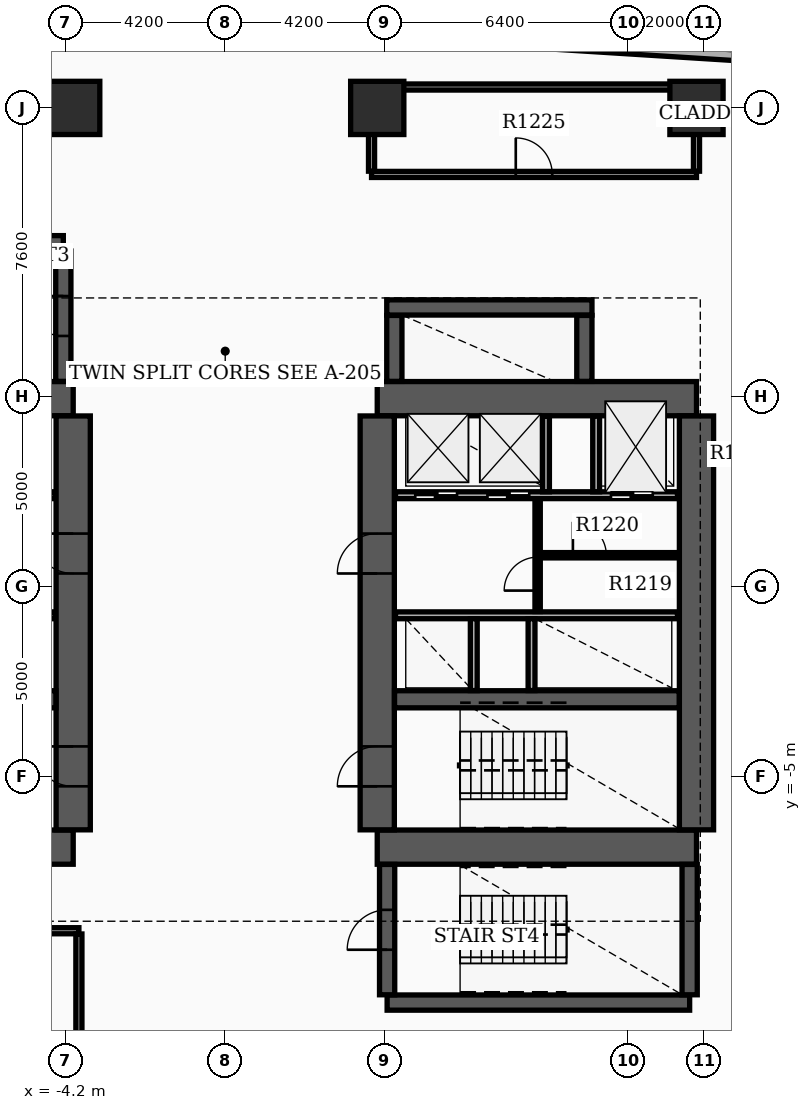
"""IFC4 building model, lengths in metres.
Left out: names, types, materials, properties, quantities, classifications, styles, units other than length and angle.
Written with IfcOpenShell. Run it as: python <this file> out.ifc"""

import sys

from ifc_helpers import new_model, si_unit, direction, frame, frame_2d, origin, origin_2d, place, context, subcontext, project, spatial, rectangle, extrude, element, fill, save


model = new_model("IFC4")
c1 = context("Model", 3, precision=1e-05, world=origin(), true_north=direction((0.0, 1.0)))
c2 = subcontext(c1, "Body", "Model", "MODEL_VIEW")
j1 = project(units=[si_unit("LENGTHUNIT", "METRE"), si_unit("PLANEANGLEUNIT", "RADIAN")], contexts=[c1])
p1 = place(None, origin())
s1 = spatial("IfcSite", under=j1, at=p1, CompositionType="ELEMENT")
p2 = place(p1, origin())
s2 = spatial("IfcBuilding", under=s1, at=p2, CompositionType="ELEMENT")
p3 = place(p2, frame((0.0, 0.0, 79.5)))
s3 = spatial("IfcBuildingStorey", under=s2, at=p3, CompositionType="ELEMENT", Elevation=79.5)
for number, where, z_axis, x_axis in (
    (1, (-12.4, -6.85, 0.0), (0.0, 0.0, 1.0), (1.0, 0.0, 0.0)),
    (2, (-12.4, 4.95, 0.0), (0.0, 0.0, 1.0), (1.0, 0.0, 0.0)),
):
    element("IfcWall", number, at=place(p3, frame(where, z_axis=z_axis, x_axis=x_axis)), inside=s3, PredefinedType="SHEAR", context=c2, shape_type="SweptSolid", body=[
        extrude(rectangle(XDim=8.4, YDim=0.9, at=frame_2d((4.2, 0.0))), origin(), (0.0, 0.0, 1.0), 3.7),
    ])
p4 = place(p3, frame((-4.0, -6.395, 0.0), z_axis=(0.0, 0.0, 1.0), x_axis=(0.0, 1.0, 0.0)))
e3 = element("IfcWall", 3, at=p4, inside=s3, PredefinedType="SHEAR", context=c2, shape_type="SweptSolid", body=[
    extrude(rectangle(XDim=10.89, YDim=0.9, at=frame_2d((5.445, 0.0))), origin(), (0.0, 0.0, 1.0), 3.7),
])
p5 = place(p4, frame((1.145, 0.0, 0.0)))
e4 = element("IfcOpeningElement", 4, at=p5, cuts=e3, PredefinedType="OPENING", context=c2, shape_type="SweptSolid", body=[
    extrude(rectangle(XDim=1.05, YDim=2.15, at=frame_2d((0.525, 1.075))), frame((0.0, 0.46, 0.0), z_axis=(0.0, -1.0, 0.0), x_axis=(1.0, 0.0, 0.0)), (0.0, 0.0, 1.0), 0.92),
])
p6 = place(p4, frame((6.745, 0.0, 0.0)))
e5 = element("IfcOpeningElement", 5, at=p6, cuts=e3, PredefinedType="OPENING", context=c2, shape_type="SweptSolid", body=[
    extrude(rectangle(XDim=1.05, YDim=2.15, at=frame_2d((0.525, 1.075))), frame((0.0, 0.46, 0.0), z_axis=(0.0, -1.0, 0.0), x_axis=(1.0, 0.0, 0.0)), (0.0, 0.0, 1.0), 0.92),
])
p7 = place(p3, frame((-11.945, -2.96, 0.0), z_axis=(0.0, 0.0, 1.0), x_axis=(1.0, 0.0, 0.0)))
e6 = element("IfcWall", 6, at=p7, inside=s3, PredefinedType="SHEAR", context=c2, shape_type="SweptSolid", body=[
    extrude(rectangle(XDim=7.49, YDim=0.45, at=frame_2d((3.745, 0.0))), origin(), (0.0, 0.0, 1.0), 3.7),
])
for number, where, z_axis, x_axis in (
    (7, (4.0, -6.85, 0.0), (0.0, 0.0, 1.0), (1.0, 0.0, 0.0)),
    (8, (4.0, 4.95, 0.0), (0.0, 0.0, 1.0), (1.0, 0.0, 0.0)),
):
    element("IfcWall", number, at=place(p3, frame(where, z_axis=z_axis, x_axis=x_axis)), inside=s3, PredefinedType="SHEAR", context=c2, shape_type="SweptSolid", body=[
        extrude(rectangle(XDim=8.4, YDim=0.9, at=frame_2d((4.2, 0.0))), origin(), (0.0, 0.0, 1.0), 3.7),
    ])
p8 = place(p3, frame((4.0, -6.395, 0.0), z_axis=(0.0, 0.0, 1.0), x_axis=(0.0, 1.0, 0.0)))
e9 = element("IfcWall", 9, at=p8, inside=s3, PredefinedType="SHEAR", context=c2, shape_type="SweptSolid", body=[
    extrude(rectangle(XDim=10.89, YDim=0.9, at=frame_2d((5.445, 0.0))), origin(), (0.0, 0.0, 1.0), 3.7),
])
p9 = place(p8, frame((1.145, 0.0, 0.0)))
e10 = element("IfcOpeningElement", 10, at=p9, cuts=e9, PredefinedType="OPENING", context=c2, shape_type="SweptSolid", body=[
    extrude(rectangle(XDim=1.05, YDim=2.15, at=frame_2d((0.525, 1.075))), frame((0.0, 0.46, 0.0), z_axis=(0.0, -1.0, 0.0), x_axis=(1.0, 0.0, 0.0)), (0.0, 0.0, 1.0), 0.92),
])
p10 = place(p8, frame((6.745, 0.0, 0.0)))
e11 = element("IfcOpeningElement", 11, at=p10, cuts=e9, PredefinedType="OPENING", context=c2, shape_type="SweptSolid", body=[
    extrude(rectangle(XDim=1.05, YDim=2.15, at=frame_2d((0.525, 1.075))), frame((0.0, 0.46, 0.0), z_axis=(0.0, -1.0, 0.0), x_axis=(1.0, 0.0, 0.0)), (0.0, 0.0, 1.0), 0.92),
])
p11 = place(p3, frame((12.4, -6.395, 0.0), z_axis=(0.0, 0.0, 1.0), x_axis=(0.0, 1.0, 0.0)))
e12 = element("IfcWall", 12, at=p11, inside=s3, PredefinedType="SHEAR", context=c2, shape_type="SweptSolid", body=[
    extrude(rectangle(XDim=10.89, YDim=0.9, at=frame_2d((5.445, 0.0))), origin(), (0.0, 0.0, 1.0), 3.7),
])
p12 = place(p3, frame((4.455, -2.96, 0.0), z_axis=(0.0, 0.0, 1.0), x_axis=(1.0, 0.0, 0.0)))
e13 = element("IfcWall", 13, at=p12, inside=s3, PredefinedType="SHEAR", context=c2, shape_type="SweptSolid", body=[
    extrude(rectangle(XDim=7.49, YDim=0.45, at=frame_2d((3.745, 0.0))), origin(), (0.0, 0.0, 1.0), 3.7),
])
p13 = place(p3, frame((-12.22, 9.04, 0.0), z_axis=(0.0, 0.0, 1.0), x_axis=(1.0, 0.0, 0.0)))
e14 = element("IfcWall", 14, at=p13, inside=s3, PredefinedType="SHEAR", context=c2, shape_type="SweptSolid", body=[
    extrude(rectangle(XDim=7.96, YDim=0.4, at=frame_2d((3.98, 0.0))), origin(), (0.0, 0.0, 1.0), 3.7),
])
p14 = place(p3, frame((-4.26, 5.405, 0.0), z_axis=(0.0, 0.0, 1.0), x_axis=(0.0, 1.0, 0.0)))
e15 = element("IfcWall", 15, at=p14, inside=s3, PredefinedType="SHEAR", context=c2, shape_type="SweptSolid", body=[
    extrude(rectangle(XDim=3.43, YDim=0.4, at=frame_2d((1.715, 0.0))), origin(), (0.0, 0.0, 1.0), 3.7),
])
p15 = place(p14, frame((1.195, 0.0, 0.0)))
e16 = element("IfcOpeningElement", 16, at=p15, cuts=e15, PredefinedType="OPENING", context=c2, shape_type="SweptSolid", body=[
    extrude(rectangle(XDim=1.05, YDim=2.15, at=frame_2d((0.525, 1.075))), frame((0.0, 0.21, 0.0), z_axis=(0.0, -1.0, 0.0), x_axis=(1.0, 0.0, 0.0)), (0.0, 0.0, 1.0), 0.42),
])
p16 = place(p3, frame((4.26, -10.94, 0.0), z_axis=(0.0, 0.0, 1.0), x_axis=(1.0, 0.0, 0.0)))
e17 = element("IfcWall", 17, at=p16, inside=s3, PredefinedType="SHEAR", context=c2, shape_type="SweptSolid", body=[
    extrude(rectangle(XDim=7.96, YDim=0.4, at=frame_2d((3.98, 0.0))), origin(), (0.0, 0.0, 1.0), 3.7),
])
p17 = place(p3, frame((4.26, -10.735, 0.0), z_axis=(0.0, 0.0, 1.0), x_axis=(0.0, 1.0, 0.0)))
e18 = element("IfcWall", 18, at=p17, inside=s3, PredefinedType="SHEAR", context=c2, shape_type="SweptSolid", body=[
    extrude(rectangle(XDim=3.43, YDim=0.4, at=frame_2d((1.715, 0.0))), origin(), (0.0, 0.0, 1.0), 3.7),
])
p18 = place(p17, frame((1.185, 0.0, 0.0)))
e19 = element("IfcOpeningElement", 19, at=p18, cuts=e18, PredefinedType="OPENING", context=c2, shape_type="SweptSolid", body=[
    extrude(rectangle(XDim=1.05, YDim=2.15, at=frame_2d((0.525, 1.075))), frame((0.0, 0.21, 0.0), z_axis=(0.0, -1.0, 0.0), x_axis=(1.0, 0.0, 0.0)), (0.0, 0.0, 1.0), 0.42),
])
p19 = place(p3, frame((12.22, -10.735, 0.0), z_axis=(0.0, 0.0, 1.0), x_axis=(0.0, 1.0, 0.0)))
e20 = element("IfcWall", 20, at=p19, inside=s3, PredefinedType="SHEAR", context=c2, shape_type="SweptSolid", body=[
    extrude(rectangle(XDim=3.43, YDim=0.4, at=frame_2d((1.715, 0.0))), origin(), (0.0, 0.0, 1.0), 3.7),
])
p20 = place(p3, frame((4.45, 5.405, 0.0), z_axis=(0.0, 0.0, 1.0), x_axis=(0.0, 1.0, 0.0)))
e21 = element("IfcWall", 21, at=p20, inside=s3, PredefinedType="SHEAR", context=c2, shape_type="SweptSolid", body=[
    extrude(rectangle(XDim=1.735, YDim=0.4, at=frame_2d((0.867, 0.0))), origin(), (0.0, 0.0, 1.0), 3.7),
])
p21 = place(p3, frame((4.25, 7.35, 0.0), z_axis=(0.0, 0.0, 1.0), x_axis=(1.0, 0.0, 0.0)))
e22 = element("IfcWall", 22, at=p21, inside=s3, PredefinedType="SHEAR", context=c2, shape_type="SweptSolid", body=[
    extrude(rectangle(XDim=5.4, YDim=0.4, at=frame_2d((2.7, 0.0))), origin(), (0.0, 0.0, 1.0), 3.7),
])
p22 = place(p3, frame((9.45, 5.405, 0.0), z_axis=(0.0, 0.0, 1.0), x_axis=(0.0, 1.0, 0.0)))
e23 = element("IfcWall", 23, at=p22, inside=s3, PredefinedType="SHEAR", context=c2, shape_type="SweptSolid", body=[
    extrude(rectangle(XDim=1.735, YDim=0.4, at=frame_2d((0.867, 0.0))), origin(), (0.0, 0.0, 1.0), 3.7),
])
for number, where, z_axis, x_axis in (
    (24, (12.4, 12.6, 0.0), (0.0, 0.0, 1.0), (1.0, 0.0, 0.0)),
    (25, (4.0, 12.6, 0.0), (0.0, 0.0, 1.0), (1.0, 0.0, 0.0)),
    (26, (-4.0, 12.6, 0.0), (0.0, 0.0, 1.0), (1.0, 0.0, 0.0)),
):
    element("IfcColumn", number, at=place(p3, frame(where, z_axis=z_axis, x_axis=x_axis)), inside=s3, PredefinedType="COLUMN", context=c2, shape_type="SweptSolid", body=[
        extrude(rectangle(XDim=1.4, YDim=1.4, at=origin_2d()), origin(), (0.0, 0.0, 1.0), 3.9),
    ])
p23 = place(p3, frame((14.063, 13.945, 0.0), z_axis=(0.0, 0.0, 1.0), x_axis=(-0.998027314704, 0.062781200242, 0.0)))
e27 = element("IfcWall", 27, at=p23, inside=s3, PredefinedType="STANDARD", context=c2, shape_type="SweptSolid", body=[
    extrude(rectangle(XDim=6.3, YDim=0.28, at=frame_2d((3.15, 0.0))), origin(), (0.0, 0.0, 1.0), 2.91),
])
p24 = place(p3, frame((-11.9, 2.41, 0.0), z_axis=(0.0, 0.0, 1.0), x_axis=(1.0, 0.0, 0.0)))
e28 = element("IfcWall", 28, at=p24, inside=s3, PredefinedType="SOLIDWALL", context=c2, shape_type="SweptSolid", body=[
    extrude(rectangle(XDim=7.42, YDim=0.18, at=frame_2d((3.71, 0.0))), origin(), (0.0, 0.0, 1.0), 2.9),
])
p25 = place(p24, frame((0.55, 0.0, 0.0)))
e29 = element("IfcOpeningElement", 29, at=p25, cuts=e28, PredefinedType="OPENING", context=c2, shape_type="SweptSolid", body=[
    extrude(rectangle(XDim=1.1, YDim=2.15, at=frame_2d((0.55, 1.075))), frame((0.0, 0.1, 0.0), z_axis=(0.0, -1.0, 0.0), x_axis=(1.0, 0.0, 0.0)), (0.0, 0.0, 1.0), 0.2),
])
p26 = place(p24, frame((3.85, 0.0, 0.0)))
e30 = element("IfcOpeningElement", 30, at=p26, cuts=e28, PredefinedType="OPENING", context=c2, shape_type="SweptSolid", body=[
    extrude(rectangle(XDim=1.1, YDim=2.15, at=frame_2d((0.55, 1.075))), frame((0.0, 0.1, 0.0), z_axis=(0.0, -1.0, 0.0), x_axis=(1.0, 0.0, 0.0)), (0.0, 0.0, 1.0), 0.2),
])
p27 = place(p24, frame((5.75, 0.0, 0.0)))
e31 = element("IfcOpeningElement", 31, at=p27, cuts=e28, PredefinedType="OPENING", context=c2, shape_type="SweptSolid", body=[
    extrude(rectangle(XDim=1.1, YDim=2.15, at=frame_2d((0.55, 1.075))), frame((0.0, 0.1, 0.0), z_axis=(0.0, -1.0, 0.0), x_axis=(1.0, 0.0, 0.0)), (0.0, 0.0, 1.0), 0.2),
])
p28 = place(p3, frame((4.48, 2.41, 0.0), z_axis=(0.0, 0.0, 1.0), x_axis=(1.0, 0.0, 0.0)))
e32 = element("IfcWall", 32, at=p28, inside=s3, PredefinedType="SOLIDWALL", context=c2, shape_type="SweptSolid", body=[
    extrude(rectangle(XDim=7.42, YDim=0.18, at=frame_2d((3.71, 0.0))), origin(), (0.0, 0.0, 1.0), 2.9),
])
p29 = place(p28, frame((5.67, 0.0, 0.0)))
e33 = element("IfcOpeningElement", 33, at=p29, cuts=e32, PredefinedType="OPENING", context=c2, shape_type="SweptSolid", body=[
    extrude(rectangle(XDim=1.1, YDim=2.15, at=frame_2d((0.55, 1.075))), frame((0.0, 0.1, 0.0), z_axis=(0.0, -1.0, 0.0), x_axis=(1.0, 0.0, 0.0)), (0.0, 0.0, 1.0), 0.2),
])
p30 = place(p28, frame((0.52, 0.0, 0.0)))
e34 = element("IfcOpeningElement", 34, at=p30, cuts=e32, PredefinedType="OPENING", context=c2, shape_type="SweptSolid", body=[
    extrude(rectangle(XDim=1.1, YDim=2.15, at=frame_2d((0.55, 1.075))), frame((0.0, 0.1, 0.0), z_axis=(0.0, -1.0, 0.0), x_axis=(1.0, 0.0, 0.0)), (0.0, 0.0, 1.0), 0.2),
])
p31 = place(p28, frame((2.42, 0.0, 0.0)))
e35 = element("IfcOpeningElement", 35, at=p31, cuts=e32, PredefinedType="OPENING", context=c2, shape_type="SweptSolid", body=[
    extrude(rectangle(XDim=1.1, YDim=2.15, at=frame_2d((0.55, 1.075))), frame((0.0, 0.1, 0.0), z_axis=(0.0, -1.0, 0.0), x_axis=(1.0, 0.0, 0.0)), (0.0, 0.0, 1.0), 0.2),
])
for number, where, z_axis, x_axis in (
    (36, (-11.9, -0.75, 0.0), (0.0, 0.0, 1.0), (1.0, 0.0, 0.0)),
    (37, (4.48, -0.75, 0.0), (0.0, 0.0, 1.0), (1.0, 0.0, 0.0)),
):
    element("IfcWall", number, at=place(p3, frame(where, z_axis=z_axis, x_axis=x_axis)), inside=s3, PredefinedType="SOLIDWALL", context=c2, shape_type="SweptSolid", body=[
        extrude(rectangle(XDim=7.42, YDim=0.18, at=frame_2d((3.71, 0.0))), origin(), (0.0, 0.0, 1.0), 2.9),
    ])
for number, where, z_axis, x_axis in (
    (38, (8.44, 2.5, 0.0), (0.0, 0.0, 1.0), (0.0, 1.0, 0.0)),
    (39, (9.76, 2.5, 0.0), (0.0, 0.0, 1.0), (0.0, 1.0, 0.0)),
):
    element("IfcWall", number, at=place(p3, frame(where, z_axis=z_axis, x_axis=x_axis)), inside=s3, PredefinedType="SOLIDWALL", context=c2, shape_type="SweptSolid", body=[
        extrude(rectangle(XDim=1.99, YDim=0.18, at=frame_2d((0.995, 0.0))), origin(), (0.0, 0.0, 1.0), 2.9),
    ])
for number, where, z_axis, x_axis in (
    (40, (6.54, -2.73, 0.0), (0.0, 0.0, 1.0), (0.0, 1.0, 0.0)),
    (41, (8.06, -2.73, 0.0), (0.0, 0.0, 1.0), (0.0, 1.0, 0.0)),
):
    element("IfcWall", number, at=place(p3, frame(where, z_axis=z_axis, x_axis=x_axis)), inside=s3, PredefinedType="SOLIDWALL", context=c2, shape_type="SweptSolid", body=[
        extrude(rectangle(XDim=1.89, YDim=0.18, at=frame_2d((0.945, 0.0))), origin(), (0.0, 0.0, 1.0), 2.9),
    ])
p32 = place(p3, frame((8.22, -0.65, 0.0), z_axis=(0.0, 0.0, 1.0), x_axis=(0.0, 1.0, 0.0)))
e42 = element("IfcWall", 42, at=p32, inside=s3, PredefinedType="SOLIDWALL", context=c2, shape_type="SweptSolid", body=[
    extrude(rectangle(XDim=2.96, YDim=0.14, at=frame_2d((1.48, 0.0))), origin(), (0.0, 0.0, 1.0), 2.9),
])
p33 = place(p32, frame((0.55, 0.0, 0.0)))
e43 = element("IfcOpeningElement", 43, at=p33, cuts=e42, PredefinedType="OPENING", context=c2, shape_type="SweptSolid", body=[
    extrude(rectangle(XDim=0.88, YDim=2.1, at=frame_2d((0.44, 1.05))), frame((0.0, 0.08, 0.0), z_axis=(0.0, -1.0, 0.0), x_axis=(1.0, 0.0, 0.0)), (0.0, 0.0, 1.0), 0.16),
])
p34 = place(p3, frame((8.298, 0.83, 0.0), z_axis=(0.0, 0.0, 1.0), x_axis=(1.0, 0.0, 0.0)))
e44 = element("IfcWall", 44, at=p34, inside=s3, PredefinedType="PARTITIONING", context=c2, shape_type="SweptSolid", body=[
    extrude(rectangle(XDim=3.552, YDim=0.14, at=frame_2d((1.776, 0.0))), origin(), (0.0, 0.0, 1.0), 2.9),
])
p35 = place(p34, frame((0.85, 0.0, 0.0)))
e45 = element("IfcOpeningElement", 45, at=p35, cuts=e44, PredefinedType="OPENING", context=c2, shape_type="SweptSolid", body=[
    extrude(rectangle(XDim=0.88, YDim=2.1, at=frame_2d((0.44, 1.05))), frame((0.0, 0.08, 0.0), z_axis=(0.0, -1.0, 0.0), x_axis=(1.0, 0.0, 0.0)), (0.0, 0.0, 1.0), 0.16),
])
p36 = place(p3, frame((3.85, 10.85, 0.0), z_axis=(0.0, 0.0, 1.0), x_axis=(1.0, 0.0, 0.0)))
e46 = element("IfcWall", 46, at=p36, inside=s3, PredefinedType="PARTITIONING", context=c2, shape_type="SweptSolid", body=[
    extrude(rectangle(XDim=8.55, YDim=0.16, at=frame_2d((4.275, 0.0))), origin(), (0.0, 0.0, 1.0), 2.9),
])
p37 = place(p36, frame((3.795, 0.0, 0.0)))
e47 = element("IfcOpeningElement", 47, at=p37, cuts=e46, PredefinedType="OPENING", context=c2, shape_type="SweptSolid", body=[
    extrude(rectangle(XDim=0.96, YDim=2.15, at=frame_2d((0.48, 1.075))), frame((0.0, 0.09, 0.0), z_axis=(0.0, -1.0, 0.0), x_axis=(1.0, 0.0, 0.0)), (0.0, 0.0, 1.0), 0.18),
])
p38 = place(p3, frame((3.85, 13.15, 0.0), z_axis=(0.0, 0.0, 1.0), x_axis=(1.0, 0.0, 0.0)))
e48 = element("IfcWall", 48, at=p38, inside=s3, PredefinedType="PARTITIONING", context=c2, shape_type="SweptSolid", body=[
    extrude(rectangle(XDim=8.55, YDim=0.16, at=frame_2d((4.275, 0.0))), origin(), (0.0, 0.0, 1.0), 2.9),
])
for number, where, z_axis, x_axis in (
    (49, (3.85, 10.935, 0.0), (0.0, 0.0, 1.0), (0.0, 1.0, 0.0)),
    (50, (12.4, 10.935, 0.0), (0.0, 0.0, 1.0), (0.0, 1.0, 0.0)),
):
    element("IfcWall", number, at=place(p3, frame(where, z_axis=z_axis, x_axis=x_axis)), inside=s3, PredefinedType="PARTITIONING", context=c2, shape_type="SweptSolid", body=[
        extrude(rectangle(XDim=2.13, YDim=0.16, at=frame_2d((1.065, 0.0))), origin(), (0.0, 0.0, 1.0), 2.9),
    ])
p39 = place(p3, frame((-12.4, -9.05, 0.0), z_axis=(0.0, 0.0, 1.0), x_axis=(1.0, 0.0, 0.0)))
e51 = element("IfcWall", 51, at=p39, inside=s3, PredefinedType="PARTITIONING", context=c2, shape_type="SweptSolid", body=[
    extrude(rectangle(XDim=8.55, YDim=0.16, at=frame_2d((4.275, 0.0))), origin(), (0.0, 0.0, 1.0), 2.9),
])
p40 = place(p39, frame((3.795, 0.0, 0.0)))
e52 = element("IfcOpeningElement", 52, at=p40, cuts=e51, PredefinedType="OPENING", context=c2, shape_type="SweptSolid", body=[
    extrude(rectangle(XDim=0.96, YDim=2.15, at=frame_2d((0.48, 1.075))), frame((0.0, 0.09, 0.0), z_axis=(0.0, -1.0, 0.0), x_axis=(1.0, 0.0, 0.0)), (0.0, 0.0, 1.0), 0.18),
])
p41 = place(p3, frame((-3.85, -13.065, 0.0), z_axis=(0.0, 0.0, 1.0), x_axis=(0.0, 1.0, 0.0)))
e53 = element("IfcWall", 53, at=p41, inside=s3, PredefinedType="PARTITIONING", context=c2, shape_type="SweptSolid", body=[
    extrude(rectangle(XDim=3.93, YDim=0.16, at=frame_2d((1.965, 0.0))), origin(), (0.0, 0.0, 1.0), 2.9),
])
p42 = place(p5, origin())
e54 = element("IfcDoor", 54, at=p42, inside=s3, OperationType="SINGLE_SWING_RIGHT", PredefinedType="DOOR", context=c2, shape_type="SweptSolid", body=[
    extrude(rectangle(XDim=1.05, YDim=2.15, at=frame_2d((0.525, 1.075))), frame((0.0, 0.025, 0.0), z_axis=(0.0, -1.0, 0.0), x_axis=(1.0, 0.0, 0.0)), (0.0, 0.0, 1.0), 0.05),
])
fill(e4, e54)
p43 = place(p9, origin())
e55 = element("IfcDoor", 55, at=p43, inside=s3, OperationType="SINGLE_SWING_LEFT", PredefinedType="DOOR", context=c2, shape_type="SweptSolid", body=[
    extrude(rectangle(XDim=1.05, YDim=2.15, at=frame_2d((0.525, 1.075))), frame((0.0, 0.025, 0.0), z_axis=(0.0, -1.0, 0.0), x_axis=(1.0, 0.0, 0.0)), (0.0, 0.0, 1.0), 0.05),
])
fill(e10, e55)
p44 = place(p6, origin())
e56 = element("IfcDoor", 56, at=p44, inside=s3, OperationType="SINGLE_SWING_RIGHT", PredefinedType="DOOR", context=c2, shape_type="SweptSolid", body=[
    extrude(rectangle(XDim=1.05, YDim=2.15, at=frame_2d((0.525, 1.075))), frame((0.0, 0.025, 0.0), z_axis=(0.0, -1.0, 0.0), x_axis=(1.0, 0.0, 0.0)), (0.0, 0.0, 1.0), 0.05),
])
fill(e5, e56)
p45 = place(p10, origin())
e57 = element("IfcDoor", 57, at=p45, inside=s3, OperationType="SINGLE_SWING_LEFT", PredefinedType="DOOR", context=c2, shape_type="SweptSolid", body=[
    extrude(rectangle(XDim=1.05, YDim=2.15, at=frame_2d((0.525, 1.075))), frame((0.0, 0.025, 0.0), z_axis=(0.0, -1.0, 0.0), x_axis=(1.0, 0.0, 0.0)), (0.0, 0.0, 1.0), 0.05),
])
fill(e11, e57)
p46 = place(p15, origin())
e58 = element("IfcDoor", 58, at=p46, inside=s3, OperationType="SINGLE_SWING_RIGHT", PredefinedType="DOOR", context=c2, shape_type="SweptSolid", body=[
    extrude(rectangle(XDim=1.05, YDim=2.15, at=frame_2d((0.525, 1.075))), frame((0.0, 0.025, 0.0), z_axis=(0.0, -1.0, 0.0), x_axis=(1.0, 0.0, 0.0)), (0.0, 0.0, 1.0), 0.05),
])
fill(e16, e58)
p47 = place(p18, origin())
e59 = element("IfcDoor", 59, at=p47, inside=s3, OperationType="SINGLE_SWING_LEFT", PredefinedType="DOOR", context=c2, shape_type="SweptSolid", body=[
    extrude(rectangle(XDim=1.05, YDim=2.15, at=frame_2d((0.525, 1.075))), frame((0.0, 0.025, 0.0), z_axis=(0.0, -1.0, 0.0), x_axis=(1.0, 0.0, 0.0)), (0.0, 0.0, 1.0), 0.05),
])
fill(e19, e59)
p48 = place(p29, origin())
e60 = element("IfcDoor", 60, at=p48, inside=s3, OperationType="DOUBLE_DOOR_SLIDING", PredefinedType="DOOR", context=c2, shape_type="SweptSolid", body=[
    extrude(rectangle(XDim=1.1, YDim=2.15, at=frame_2d((0.55, 1.075))), frame((0.0, 0.025, 0.0), z_axis=(0.0, -1.0, 0.0), x_axis=(1.0, 0.0, 0.0)), (0.0, 0.0, 1.0), 0.05),
])
fill(e33, e60)
p49 = place(p30, origin())
e61 = element("IfcDoor", 61, at=p49, inside=s3, OperationType="DOUBLE_DOOR_SLIDING", PredefinedType="DOOR", context=c2, shape_type="SweptSolid", body=[
    extrude(rectangle(XDim=1.1, YDim=2.15, at=frame_2d((0.55, 1.075))), frame((0.0, 0.025, 0.0), z_axis=(0.0, -1.0, 0.0), x_axis=(1.0, 0.0, 0.0)), (0.0, 0.0, 1.0), 0.05),
])
fill(e34, e61)
p50 = place(p31, origin())
e62 = element("IfcDoor", 62, at=p50, inside=s3, OperationType="DOUBLE_DOOR_SLIDING", PredefinedType="DOOR", context=c2, shape_type="SweptSolid", body=[
    extrude(rectangle(XDim=1.1, YDim=2.15, at=frame_2d((0.55, 1.075))), frame((0.0, 0.025, 0.0), z_axis=(0.0, -1.0, 0.0), x_axis=(1.0, 0.0, 0.0)), (0.0, 0.0, 1.0), 0.05),
])
fill(e35, e62)
p51 = place(p33, origin())
e63 = element("IfcDoor", 63, at=p51, inside=s3, OperationType="SINGLE_SWING_LEFT", PredefinedType="DOOR", context=c2, shape_type="SweptSolid", body=[
    extrude(rectangle(XDim=0.88, YDim=2.1, at=frame_2d((0.44, 1.05))), frame((0.0, 0.025, 0.0), z_axis=(0.0, -1.0, 0.0), x_axis=(1.0, 0.0, 0.0)), (0.0, 0.0, 1.0), 0.05),
])
fill(e43, e63)
p52 = place(p35, origin())
e64 = element("IfcDoor", 64, at=p52, inside=s3, OperationType="SINGLE_SWING_LEFT", PredefinedType="DOOR", context=c2, shape_type="SweptSolid", body=[
    extrude(rectangle(XDim=0.88, YDim=2.1, at=frame_2d((0.44, 1.05))), frame((0.0, 0.025, 0.0), z_axis=(0.0, -1.0, 0.0), x_axis=(1.0, 0.0, 0.0)), (0.0, 0.0, 1.0), 0.05),
])
fill(e45, e64)
p53 = place(p37, origin())
e65 = element("IfcDoor", 65, at=p53, inside=s3, OperationType="SINGLE_SWING_LEFT", PredefinedType="DOOR", context=c2, shape_type="SweptSolid", body=[
    extrude(rectangle(XDim=0.96, YDim=2.15, at=frame_2d((0.48, 1.075))), frame((0.0, 0.025, 0.0), z_axis=(0.0, -1.0, 0.0), x_axis=(1.0, 0.0, 0.0)), (0.0, 0.0, 1.0), 0.05),
])
fill(e47, e65)
save(model, sys.argv[1])
